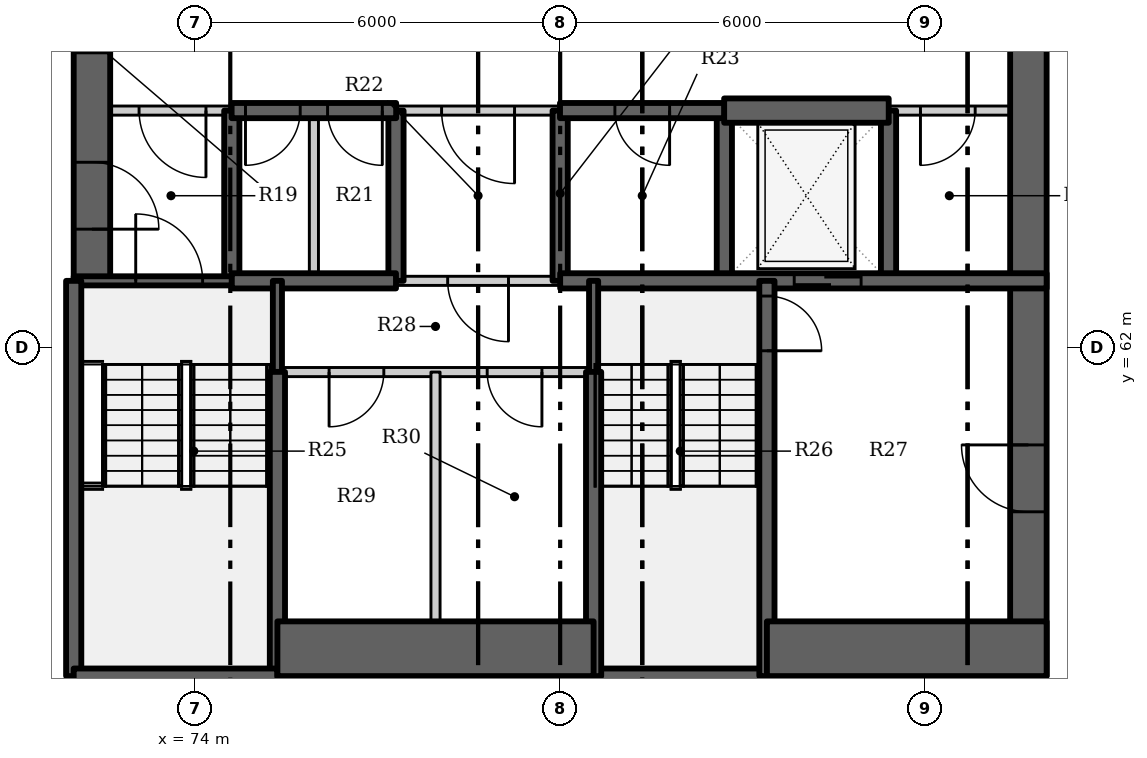
"""IFC4 building model, lengths in metres.
Left out: names, types, materials, properties, quantities, classifications, styles, units other than length and angle.
Written with IfcOpenShell. Run it as: python <this file> out.ifc"""

import sys

from ifc_helpers import new_model, si_unit, direction, frame, frame_2d, origin, place, context, subcontext, project, spatial, rectangle, extrude, element, fill, save


model = new_model("IFC4")
c1 = context("Model", 3, precision=1e-05, world=origin(), true_north=direction((0.0, 1.0)))
c2 = subcontext(c1, "Body", "Model", "MODEL_VIEW")
j1 = project(units=[si_unit("LENGTHUNIT", "METRE"), si_unit("PLANEANGLEUNIT", "RADIAN")], contexts=[c1])
p1 = place(None, origin())
s1 = spatial("IfcSite", under=j1, at=p1, CompositionType="ELEMENT")
p2 = place(p1, origin())
s2 = spatial("IfcBuilding", under=s1, at=p2, CompositionType="ELEMENT")
p3 = place(p2, origin())
s3 = spatial("IfcBuildingStorey", under=s2, at=p3, CompositionType="ELEMENT", Elevation=0.0)
p4 = place(p3, frame((74.6, 63.1, -1.8), z_axis=(0.0, 0.0, 1.0), x_axis=(0.0, 1.0, 0.0)))
e1 = element("IfcWall", 1, at=p4, inside=s3, PredefinedType="SHEAR", context=c2, shape_type="SweptSolid", body=[
    extrude(rectangle(XDim=2.8, YDim=0.25, at=frame_2d((1.4, 0.0))), origin(), (0.0, 0.0, 1.0), 8.1),
])
p5 = place(p3, frame((72.3, 72.2, -1.8), z_axis=(0.0, 0.0, 1.0), x_axis=(0.0, -1.0, 0.0)))
e2 = element("IfcWall", 2, at=p5, inside=s3, PredefinedType="SHEAR", context=c2, shape_type="SweptSolid", body=[
    extrude(rectangle(XDim=9.1, YDim=0.6, at=frame_2d((4.55, 0.0))), origin(), (0.0, 0.0, 1.0), 8.1),
])
p6 = place(p5, frame((7.15, 0.0, 1.8)))
e3 = element("IfcOpeningElement", 3, at=p6, cuts=e2, PredefinedType="OPENING", context=c2, shape_type="SweptSolid", body=[
    extrude(rectangle(XDim=1.1, YDim=2.1, at=frame_2d((0.55, 1.05))), frame((0.0, 0.31, 0.0), z_axis=(0.0, -1.0, 0.0), x_axis=(1.0, 0.0, 0.0)), (0.0, 0.0, 1.0), 0.62),
])
p7 = place(p5, frame((3.85, 0.0, 1.8)))
e4 = element("IfcOpeningElement", 4, at=p7, cuts=e2, PredefinedType="OPENING", context=c2, shape_type="SweptSolid", body=[
    extrude(rectangle(XDim=1.5, YDim=2.1, at=frame_2d((0.75, 1.05))), frame((0.0, 0.31, 0.0), z_axis=(0.0, -1.0, 0.0), x_axis=(1.0, 0.0, 0.0)), (0.0, 0.0, 1.0), 0.62),
])
for number, where, z_axis, x_axis in (
    (5, (77.3, 63.1, -1.8), (0.0, 0.0, 1.0), (0.0, 1.0, 0.0)),
    (6, (80.0, 63.1, -1.8), (0.0, 0.0, 1.0), (0.0, 1.0, 0.0)),
    (7, (82.7, 63.1, -1.8), (0.0, 0.0, 1.0), (0.0, 1.0, 0.0)),
    (8, (85.4, 63.1, -1.8), (0.0, 0.0, 1.0), (0.0, 1.0, 0.0)),
):
    element("IfcWall", number, at=place(p3, frame(where, z_axis=z_axis, x_axis=x_axis)), inside=s3, PredefinedType="SHEAR", context=c2, shape_type="SweptSolid", body=[
        extrude(rectangle(XDim=2.8, YDim=0.25, at=frame_2d((1.4, 0.0))), origin(), (0.0, 0.0, 1.0), 8.1),
    ])
p8 = place(p3, frame((87.7, 56.6, -1.8), z_axis=(0.0, 0.0, 1.0), x_axis=(0.0, 1.0, 0.0)))
e9 = element("IfcWall", 9, at=p8, inside=s3, PredefinedType="SHEAR", context=c2, shape_type="SweptSolid", body=[
    extrude(rectangle(XDim=15.6, YDim=0.6, at=frame_2d((7.8, 0.0))), origin(), (0.0, 0.0, 1.0), 8.1),
])
p9 = place(p8, frame((2.702, 0.0, 1.8)))
e10 = element("IfcOpeningElement", 10, at=p9, cuts=e9, PredefinedType="OPENING", context=c2, shape_type="SweptSolid", body=[
    extrude(rectangle(XDim=1.1, YDim=2.1, at=frame_2d((0.55, 1.05))), frame((0.0, 0.31, 0.0), z_axis=(0.0, -1.0, 0.0), x_axis=(1.0, 0.0, 0.0)), (0.0, 0.0, 1.0), 0.62),
])
p10 = place(p3, frame((74.603, 65.9, 0.0), z_axis=(0.0, 0.0, 1.0), x_axis=(-1.0, 0.0, 0.0)))
e11 = element("IfcWall", 11, at=p10, inside=s3, PredefinedType="PARTITIONING", context=c2, shape_type="SweptSolid", body=[
    extrude(rectangle(XDim=2.603, YDim=0.15, at=frame_2d((1.302, 0.0))), origin(), (0.0, 0.0, 1.0), 6.3),
])
p11 = place(p10, frame((0.428, 0.0, 0.0)))
e12 = element("IfcOpeningElement", 12, at=p11, cuts=e11, PredefinedType="OPENING", context=c2, shape_type="SweptSolid", body=[
    extrude(rectangle(XDim=1.1, YDim=2.1, at=frame_2d((0.55, 1.05))), frame((0.0, 0.085, 0.0), z_axis=(0.0, -1.0, 0.0), x_axis=(1.0, 0.0, 0.0)), (0.0, 0.0, 1.0), 0.17),
])
p12 = place(p3, frame((80.003, 65.9, 0.0), z_axis=(0.0, 0.0, 1.0), x_axis=(-1.0, 0.0, 0.0)))
e13 = element("IfcWall", 13, at=p12, inside=s3, PredefinedType="PARTITIONING", context=c2, shape_type="SweptSolid", body=[
    extrude(rectangle(XDim=2.706, YDim=0.15, at=frame_2d((1.353, 0.0))), origin(), (0.0, 0.0, 1.0), 6.3),
])
p13 = place(p12, frame((0.753, 0.0, 0.0)))
e14 = element("IfcOpeningElement", 14, at=p13, cuts=e13, PredefinedType="OPENING", context=c2, shape_type="SweptSolid", body=[
    extrude(rectangle(XDim=1.2, YDim=2.1, at=frame_2d((0.6, 1.05))), frame((0.0, 0.085, 0.0), z_axis=(0.0, -1.0, 0.0), x_axis=(1.0, 0.0, 0.0)), (0.0, 0.0, 1.0), 0.17),
])
p14 = place(p3, frame((88.0, 65.9, 0.0), z_axis=(0.0, 0.0, 1.0), x_axis=(-1.0, 0.0, 0.0)))
e15 = element("IfcWall", 15, at=p14, inside=s3, PredefinedType="PARTITIONING", context=c2, shape_type="SweptSolid", body=[
    extrude(rectangle(XDim=2.603, YDim=0.15, at=frame_2d((1.302, 0.0))), origin(), (0.0, 0.0, 1.0), 6.3),
])
p15 = place(p14, frame((1.175, 0.0, 0.0)))
e16 = element("IfcOpeningElement", 16, at=p15, cuts=e15, PredefinedType="OPENING", context=c2, shape_type="SweptSolid", body=[
    extrude(rectangle(XDim=0.9, YDim=2.1, at=frame_2d((0.45, 1.05))), frame((0.0, 0.085, 0.0), z_axis=(0.0, -1.0, 0.0), x_axis=(1.0, 0.0, 0.0)), (0.0, 0.0, 1.0), 0.17),
])
p16 = place(p3, frame((77.303, 65.9, -1.8), z_axis=(0.0, 0.0, 1.0), x_axis=(-1.0, 0.0, 0.0)))
e17 = element("IfcWall", 17, at=p16, inside=s3, PredefinedType="SHEAR", context=c2, shape_type="SweptSolid", body=[
    extrude(rectangle(XDim=2.706, YDim=0.25, at=frame_2d((1.353, 0.0))), origin(), (0.0, 0.0, 1.0), 8.1),
])
p17 = place(p16, frame((1.578, 0.0, 1.8)))
e18 = element("IfcOpeningElement", 18, at=p17, cuts=e17, PredefinedType="OPENING", context=c2, shape_type="SweptSolid", body=[
    extrude(rectangle(XDim=0.9, YDim=2.1, at=frame_2d((0.45, 1.05))), frame((0.0, 0.135, 0.0), z_axis=(0.0, -1.0, 0.0), x_axis=(1.0, 0.0, 0.0)), (0.0, 0.0, 1.0), 0.27),
])
p18 = place(p16, frame((0.228, 0.0, 1.8)))
e19 = element("IfcOpeningElement", 19, at=p18, cuts=e17, PredefinedType="OPENING", context=c2, shape_type="SweptSolid", body=[
    extrude(rectangle(XDim=0.9, YDim=2.1, at=frame_2d((0.45, 1.05))), frame((0.0, 0.135, 0.0), z_axis=(0.0, -1.0, 0.0), x_axis=(1.0, 0.0, 0.0)), (0.0, 0.0, 1.0), 0.27),
])
p19 = place(p3, frame((82.703, 65.9, -1.8), z_axis=(0.0, 0.0, 1.0), x_axis=(-1.0, 0.0, 0.0)))
e20 = element("IfcWall", 20, at=p19, inside=s3, PredefinedType="SHEAR", context=c2, shape_type="SweptSolid", body=[
    extrude(rectangle(XDim=2.706, YDim=0.25, at=frame_2d((1.353, 0.0))), origin(), (0.0, 0.0, 1.0), 8.1),
])
p20 = place(p19, frame((0.903, 0.0, 1.8)))
e21 = element("IfcOpeningElement", 21, at=p20, cuts=e20, PredefinedType="OPENING", context=c2, shape_type="SweptSolid", body=[
    extrude(rectangle(XDim=0.9, YDim=2.1, at=frame_2d((0.45, 1.05))), frame((0.0, 0.135, 0.0), z_axis=(0.0, -1.0, 0.0), x_axis=(1.0, 0.0, 0.0)), (0.0, 0.0, 1.0), 0.27),
])
p21 = place(p3, frame((82.697, 65.9, -1.8), z_axis=(0.0, 0.0, 1.0), x_axis=(1.0, 0.0, 0.0)))
e22 = element("IfcWall", 22, at=p21, inside=s3, PredefinedType="SHEAR", context=c2, shape_type="SweptSolid", body=[
    extrude(rectangle(XDim=2.706, YDim=0.4, at=frame_2d((1.353, 0.0))), origin(), (0.0, 0.0, 1.0), 8.1),
])
p22 = place(p3, frame((72.0, 63.1, -1.8), z_axis=(0.0, 0.0, 1.0), x_axis=(1.0, 0.0, 0.0)))
e23 = element("IfcWall", 23, at=p22, inside=s3, PredefinedType="SHEAR", context=c2, shape_type="SweptSolid", body=[
    extrude(rectangle(XDim=2.6, YDim=0.15, at=frame_2d((1.3, 0.0))), origin(), (0.0, 0.0, 1.0), 8.1),
])
p23 = place(p22, frame((1.02, 0.0, 1.8)))
e24 = element("IfcOpeningElement", 24, at=p23, cuts=e23, PredefinedType="OPENING", context=c2, shape_type="SweptSolid", body=[
    extrude(rectangle(XDim=1.1, YDim=2.1, at=frame_2d((0.55, 1.05))), frame((0.0, 0.085, 0.0), z_axis=(0.0, -1.0, 0.0), x_axis=(1.0, 0.0, 0.0)), (0.0, 0.0, 1.0), 0.17),
])
p24 = place(p3, frame((75.95, 63.1, 0.0), z_axis=(0.0, 0.0, 1.0), x_axis=(0.0, 1.0, 0.0)))
e25 = element("IfcWall", 25, at=p24, inside=s3, PredefinedType="PARTITIONING", context=c2, shape_type="SweptSolid", body=[
    extrude(rectangle(XDim=2.8, YDim=0.15, at=frame_2d((1.4, 0.0))), origin(), (0.0, 0.0, 1.0), 6.3),
])
p25 = place(p3, frame((74.6, 63.1, -1.8), z_axis=(0.0, 0.0, 1.0), x_axis=(1.0, 0.0, 0.0)))
e26 = element("IfcWall", 26, at=p25, inside=s3, PredefinedType="SHEAR", context=c2, shape_type="SweptSolid", body=[
    extrude(rectangle(XDim=2.7, YDim=0.25, at=frame_2d((1.35, 0.0))), origin(), (0.0, 0.0, 1.0), 8.1),
])
p26 = place(p3, frame((80.0, 63.1, -1.8), z_axis=(0.0, 0.0, 1.0), x_axis=(1.0, 0.0, 0.0)))
e27 = element("IfcWall", 27, at=p26, inside=s3, PredefinedType="SHEAR", context=c2, shape_type="SweptSolid", body=[
    extrude(rectangle(XDim=8.0, YDim=0.25, at=frame_2d((4.0, 0.0))), origin(), (0.0, 0.0, 1.0), 8.1),
])
p27 = place(p26, frame((3.849, 0.0, 1.8)))
e28 = element("IfcOpeningElement", 28, at=p27, cuts=e27, PredefinedType="OPENING", context=c2, shape_type="SweptSolid", body=[
    extrude(rectangle(XDim=1.1, YDim=2.1, at=frame_2d((0.55, 1.05))), frame((0.0, 0.135, 0.0), z_axis=(0.0, -1.0, 0.0), x_axis=(1.0, 0.0, 0.0)), (0.0, 0.0, 1.0), 0.27),
])
p28 = place(p3, frame((80.0, 63.1, 0.0), z_axis=(0.0, 0.0, 1.0), x_axis=(-1.0, 0.0, 0.0)))
e29 = element("IfcWall", 29, at=p28, inside=s3, PredefinedType="PARTITIONING", context=c2, shape_type="SweptSolid", body=[
    extrude(rectangle(XDim=2.7, YDim=0.15, at=frame_2d((1.35, 0.0))), origin(), (0.0, 0.0, 1.0), 6.3),
])
p29 = place(p28, frame((0.85, 0.0, 0.0)))
e30 = element("IfcOpeningElement", 30, at=p29, cuts=e29, PredefinedType="OPENING", context=c2, shape_type="SweptSolid", body=[
    extrude(rectangle(XDim=1.0, YDim=2.1, at=frame_2d((0.5, 1.05))), frame((0.0, 0.085, 0.0), z_axis=(0.0, -1.0, 0.0), x_axis=(1.0, 0.0, 0.0)), (0.0, 0.0, 1.0), 0.17),
])
p30 = place(p3, frame((75.35, 61.597, -1.8), z_axis=(0.0, 0.0, 1.0), x_axis=(0.0, 1.0, 0.0)))
e31 = element("IfcWall", 31, at=p30, inside=s3, PredefinedType="SHEAR", context=c2, shape_type="SweptSolid", body=[
    extrude(rectangle(XDim=1.503, YDim=0.15, at=frame_2d((0.751, 0.0))), origin(), (0.0, 0.0, 1.0), 8.1),
])
p31 = place(p3, frame((75.35, 56.6, -1.8), z_axis=(0.0, 0.0, 1.0), x_axis=(0.0, 1.0, 0.0)))
e32 = element("IfcWall", 32, at=p31, inside=s3, PredefinedType="SHEAR", context=c2, shape_type="SweptSolid", body=[
    extrude(rectangle(XDim=5.003, YDim=0.25, at=frame_2d((2.501, 0.0))), origin(), (0.0, 0.0, 1.0), 8.1),
])
p32 = place(p3, frame((72.0, 56.6, -1.8), z_axis=(0.0, 0.0, 1.0), x_axis=(0.0, 1.0, 0.0)))
e33 = element("IfcWall", 33, at=p32, inside=s3, PredefinedType="SHEAR", context=c2, shape_type="SweptSolid", body=[
    extrude(rectangle(XDim=6.5, YDim=0.25, at=frame_2d((3.25, 0.0))), origin(), (0.0, 0.0, 1.0), 8.1),
])
p33 = place(p3, frame((72.0, 56.6, -1.8), z_axis=(0.0, 0.0, 1.0), x_axis=(1.0, 0.0, 0.0)))
e34 = element("IfcWall", 34, at=p33, inside=s3, PredefinedType="SHEAR", context=c2, shape_type="SweptSolid", body=[
    extrude(rectangle(XDim=3.35, YDim=0.25, at=frame_2d((1.675, 0.0))), origin(), (0.0, 0.0, 1.0), 8.1),
])
p34 = place(p3, frame((80.55, 56.6, -1.8), z_axis=(0.0, 0.0, 1.0), x_axis=(1.0, 0.0, 0.0)))
e35 = element("IfcWall", 35, at=p34, inside=s3, PredefinedType="SHEAR", context=c2, shape_type="SweptSolid", body=[
    extrude(rectangle(XDim=2.85, YDim=0.25, at=frame_2d((1.425, 0.0))), origin(), (0.0, 0.0, 1.0), 8.1),
])
p35 = place(p3, frame((83.4, 63.1, -1.8), z_axis=(0.0, 0.0, 1.0), x_axis=(0.0, -1.0, 0.0)))
e36 = element("IfcWall", 36, at=p35, inside=s3, PredefinedType="SHEAR", context=c2, shape_type="SweptSolid", body=[
    extrude(rectangle(XDim=6.5, YDim=0.25, at=frame_2d((3.25, 0.0))), origin(), (0.0, 0.0, 1.0), 8.1),
])
p36 = place(p35, frame((0.25, 0.0, 1.8)))
e37 = element("IfcOpeningElement", 37, at=p36, cuts=e36, PredefinedType="OPENING", context=c2, shape_type="SweptSolid", body=[
    extrude(rectangle(XDim=0.9, YDim=2.1, at=frame_2d((0.45, 1.05))), frame((0.0, 0.135, 0.0), z_axis=(0.0, -1.0, 0.0), x_axis=(1.0, 0.0, 0.0)), (0.0, 0.0, 1.0), 0.27),
])
p37 = place(p3, frame((80.55, 61.597, -1.8), z_axis=(0.0, 0.0, 1.0), x_axis=(0.0, 1.0, 0.0)))
e38 = element("IfcWall", 38, at=p37, inside=s3, PredefinedType="SHEAR", context=c2, shape_type="SweptSolid", body=[
    extrude(rectangle(XDim=1.503, YDim=0.15, at=frame_2d((0.751, 0.0))), origin(), (0.0, 0.0, 1.0), 8.1),
])
p38 = place(p3, frame((80.55, 56.6, -1.8), z_axis=(0.0, 0.0, 1.0), x_axis=(0.0, 1.0, 0.0)))
e39 = element("IfcWall", 39, at=p38, inside=s3, PredefinedType="SHEAR", context=c2, shape_type="SweptSolid", body=[
    extrude(rectangle(XDim=5.003, YDim=0.25, at=frame_2d((2.501, 0.0))), origin(), (0.0, 0.0, 1.0), 8.1),
])
p39 = place(p3, frame((75.35, 57.05, -1.8), z_axis=(0.0, 0.0, 1.0), x_axis=(1.0, 0.0, 0.0)))
e40 = element("IfcWall", 40, at=p39, inside=s3, PredefinedType="SHEAR", context=c2, shape_type="SweptSolid", body=[
    extrude(rectangle(XDim=5.2, YDim=0.9, at=frame_2d((2.6, 0.0))), origin(), (0.0, 0.0, 1.0), 8.1),
])
p40 = place(p3, frame((83.4, 57.05, -1.8), z_axis=(0.0, 0.0, 1.0), x_axis=(1.0, 0.0, 0.0)))
e41 = element("IfcWall", 41, at=p40, inside=s3, PredefinedType="SHEAR", context=c2, shape_type="SweptSolid", body=[
    extrude(rectangle(XDim=4.6, YDim=0.9, at=frame_2d((2.3, 0.0))), origin(), (0.0, 0.0, 1.0), 8.1),
])
p41 = place(p3, frame((80.55, 61.6, 0.0), z_axis=(0.0, 0.0, 1.0), x_axis=(-1.0, 0.0, 0.0)))
e42 = element("IfcWall", 42, at=p41, inside=s3, PredefinedType="PARTITIONING", context=c2, shape_type="SweptSolid", body=[
    extrude(rectangle(XDim=5.2, YDim=0.15, at=frame_2d((2.6, 0.0))), origin(), (0.0, 0.0, 1.0), 6.3),
])
p42 = place(p41, frame((3.45, 0.0, 0.0)))
e43 = element("IfcOpeningElement", 43, at=p42, cuts=e42, PredefinedType="OPENING", context=c2, shape_type="SweptSolid", body=[
    extrude(rectangle(XDim=0.9, YDim=2.1, at=frame_2d((0.45, 1.05))), frame((0.0, 0.085, 0.0), z_axis=(0.0, -1.0, 0.0), x_axis=(1.0, 0.0, 0.0)), (0.0, 0.0, 1.0), 0.17),
])
p43 = place(p41, frame((0.85, 0.0, 0.0)))
e44 = element("IfcOpeningElement", 44, at=p43, cuts=e42, PredefinedType="OPENING", context=c2, shape_type="SweptSolid", body=[
    extrude(rectangle(XDim=0.9, YDim=2.1, at=frame_2d((0.45, 1.05))), frame((0.0, 0.085, 0.0), z_axis=(0.0, -1.0, 0.0), x_axis=(1.0, 0.0, 0.0)), (0.0, 0.0, 1.0), 0.17),
])
p44 = place(p3, frame((77.95, 56.6, 0.0), z_axis=(0.0, 0.0, 1.0), x_axis=(0.0, 1.0, 0.0)))
e45 = element("IfcWall", 45, at=p44, inside=s3, PredefinedType="PARTITIONING", context=c2, shape_type="SweptSolid", body=[
    extrude(rectangle(XDim=5.0, YDim=0.15, at=frame_2d((2.5, 0.0))), origin(), (0.0, 0.0, 1.0), 6.3),
])
p45 = place(p11, origin())
e46 = element("IfcDoor", 46, at=p45, inside=s3, OperationType="SINGLE_SWING_LEFT", PredefinedType="DOOR", context=c2, shape_type="SweptSolid", body=[
    extrude(rectangle(XDim=1.1, YDim=2.1, at=frame_2d((0.55, 1.05))), frame((0.0, 0.025, 0.0), z_axis=(0.0, -1.0, 0.0), x_axis=(1.0, 0.0, 0.0)), (0.0, 0.0, 1.0), 0.05),
])
fill(e12, e46)
p46 = place(p17, origin())
e47 = element("IfcDoor", 47, at=p46, inside=s3, OperationType="SINGLE_SWING_RIGHT", PredefinedType="DOOR", context=c2, shape_type="SweptSolid", body=[
    extrude(rectangle(XDim=0.9, YDim=2.1, at=frame_2d((0.45, 1.05))), frame((0.0, 0.025, 0.0), z_axis=(0.0, -1.0, 0.0), x_axis=(1.0, 0.0, 0.0)), (0.0, 0.0, 1.0), 0.05),
])
fill(e18, e47)
p47 = place(p18, origin())
e48 = element("IfcDoor", 48, at=p47, inside=s3, OperationType="SINGLE_SWING_LEFT", PredefinedType="DOOR", context=c2, shape_type="SweptSolid", body=[
    extrude(rectangle(XDim=0.9, YDim=2.1, at=frame_2d((0.45, 1.05))), frame((0.0, 0.025, 0.0), z_axis=(0.0, -1.0, 0.0), x_axis=(1.0, 0.0, 0.0)), (0.0, 0.0, 1.0), 0.05),
])
fill(e19, e48)
p48 = place(p13, origin())
e49 = element("IfcDoor", 49, at=p48, inside=s3, OperationType="DOUBLE_DOOR_SINGLE_SWING", PredefinedType="DOOR", context=c2, shape_type="SweptSolid", body=[
    extrude(rectangle(XDim=1.2, YDim=2.1, at=frame_2d((0.6, 1.05))), frame((0.0, 0.025, 0.0), z_axis=(0.0, -1.0, 0.0), x_axis=(1.0, 0.0, 0.0)), (0.0, 0.0, 1.0), 0.05),
])
fill(e14, e49)
p49 = place(p20, origin())
e50 = element("IfcDoor", 50, at=p49, inside=s3, OperationType="SINGLE_SWING_LEFT", PredefinedType="DOOR", context=c2, shape_type="SweptSolid", body=[
    extrude(rectangle(XDim=0.9, YDim=2.1, at=frame_2d((0.45, 1.05))), frame((0.0, 0.025, 0.0), z_axis=(0.0, -1.0, 0.0), x_axis=(1.0, 0.0, 0.0)), (0.0, 0.0, 1.0), 0.05),
])
fill(e21, e50)
p50 = place(p27, origin())
e51 = element("IfcDoor", 51, at=p50, inside=s3, OperationType="SLIDING_TO_LEFT", PredefinedType="DOOR", context=c2, shape_type="SweptSolid", body=[
    extrude(rectangle(XDim=1.1, YDim=2.1, at=frame_2d((0.55, 1.05))), frame((0.0, 0.025, 0.0), z_axis=(0.0, -1.0, 0.0), x_axis=(1.0, 0.0, 0.0)), (0.0, 0.0, 1.0), 0.05),
])
fill(e28, e51)
p51 = place(p15, origin())
e52 = element("IfcDoor", 52, at=p51, inside=s3, OperationType="SINGLE_SWING_RIGHT", PredefinedType="DOOR", context=c2, shape_type="SweptSolid", body=[
    extrude(rectangle(XDim=0.9, YDim=2.1, at=frame_2d((0.45, 1.05))), frame((0.0, 0.025, 0.0), z_axis=(0.0, -1.0, 0.0), x_axis=(1.0, 0.0, 0.0)), (0.0, 0.0, 1.0), 0.05),
])
fill(e16, e52)
p52 = place(p29, origin())
e53 = element("IfcDoor", 53, at=p52, inside=s3, OperationType="SINGLE_SWING_LEFT", PredefinedType="DOOR", context=c2, shape_type="SweptSolid", body=[
    extrude(rectangle(XDim=1.0, YDim=2.1, at=frame_2d((0.5, 1.05))), frame((0.0, 0.025, 0.0), z_axis=(0.0, -1.0, 0.0), x_axis=(1.0, 0.0, 0.0)), (0.0, 0.0, 1.0), 0.05),
])
fill(e30, e53)
p53 = place(p42, origin())
e54 = element("IfcDoor", 54, at=p53, inside=s3, OperationType="SINGLE_SWING_RIGHT", PredefinedType="DOOR", context=c2, shape_type="SweptSolid", body=[
    extrude(rectangle(XDim=0.9, YDim=2.1, at=frame_2d((0.45, 1.05))), frame((0.0, 0.025, 0.0), z_axis=(0.0, -1.0, 0.0), x_axis=(1.0, 0.0, 0.0)), (0.0, 0.0, 1.0), 0.05),
])
fill(e43, e54)
p54 = place(p43, origin())
e55 = element("IfcDoor", 55, at=p54, inside=s3, OperationType="SINGLE_SWING_LEFT", PredefinedType="DOOR", context=c2, shape_type="SweptSolid", body=[
    extrude(rectangle(XDim=0.9, YDim=2.1, at=frame_2d((0.45, 1.05))), frame((0.0, 0.025, 0.0), z_axis=(0.0, -1.0, 0.0), x_axis=(1.0, 0.0, 0.0)), (0.0, 0.0, 1.0), 0.05),
])
fill(e44, e55)
p55 = place(p23, origin())
e56 = element("IfcDoor", 56, at=p55, inside=s3, OperationType="SINGLE_SWING_LEFT", PredefinedType="DOOR", context=c2, shape_type="SweptSolid", body=[
    extrude(rectangle(XDim=1.1, YDim=2.1, at=frame_2d((0.55, 1.05))), frame((0.0, 0.025, 0.0), z_axis=(0.0, -1.0, 0.0), x_axis=(1.0, 0.0, 0.0)), (0.0, 0.0, 1.0), 0.05),
])
fill(e24, e56)
p56 = place(p36, origin())
e57 = element("IfcDoor", 57, at=p56, inside=s3, OperationType="SINGLE_SWING_RIGHT", PredefinedType="DOOR", context=c2, shape_type="SweptSolid", body=[
    extrude(rectangle(XDim=0.9, YDim=2.1, at=frame_2d((0.45, 1.05))), frame((0.0, 0.025, 0.0), z_axis=(0.0, -1.0, 0.0), x_axis=(1.0, 0.0, 0.0)), (0.0, 0.0, 1.0), 0.05),
])
fill(e37, e57)
p57 = place(p6, origin())
e58 = element("IfcDoor", 58, at=p57, inside=s3, OperationType="SINGLE_SWING_RIGHT", PredefinedType="DOOR", context=c2, shape_type="SweptSolid", body=[
    extrude(rectangle(XDim=1.1, YDim=2.1, at=frame_2d((0.55, 1.05))), frame((0.0, 0.025, 0.0), z_axis=(0.0, -1.0, 0.0), x_axis=(1.0, 0.0, 0.0)), (0.0, 0.0, 1.0), 0.05),
])
fill(e3, e58)
p58 = place(p7, origin())
e59 = element("IfcDoor", 59, at=p58, inside=s3, OperationType="DOUBLE_DOOR_SINGLE_SWING", PredefinedType="DOOR", context=c2, shape_type="SweptSolid", body=[
    extrude(rectangle(XDim=1.5, YDim=2.1, at=frame_2d((0.75, 1.05))), frame((0.0, 0.025, 0.0), z_axis=(0.0, -1.0, 0.0), x_axis=(1.0, 0.0, 0.0)), (0.0, 0.0, 1.0), 0.05),
])
fill(e4, e59)
p59 = place(p9, origin())
e60 = element("IfcDoor", 60, at=p59, inside=s3, OperationType="SINGLE_SWING_RIGHT", PredefinedType="DOOR", context=c2, shape_type="SweptSolid", body=[
    extrude(rectangle(XDim=1.1, YDim=2.1, at=frame_2d((0.55, 1.05))), frame((0.0, 0.025, 0.0), z_axis=(0.0, -1.0, 0.0), x_axis=(1.0, 0.0, 0.0)), (0.0, 0.0, 1.0), 0.05),
])
fill(e10, e60)
save(model, sys.argv[1])
